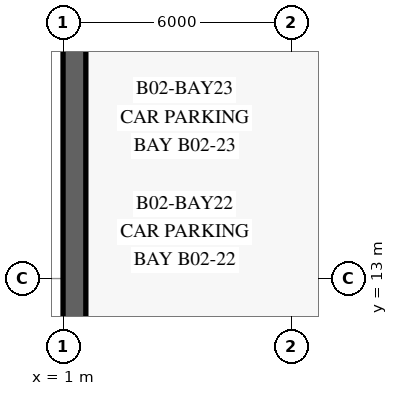
"""IFC4 building model, lengths in metres.
Left out: names, types, materials, properties, quantities, classifications, styles, units other than length and angle.
Written with IfcOpenShell. Run it as: python <this file> out.ifc"""

import sys

from ifc_helpers import new_model, si_unit, direction, frame, frame_2d, origin, place, context, subcontext, project, spatial, rectangle, extrude, element, save


model = new_model("IFC4")
c1 = context("Model", 3, precision=1e-05, world=origin(), true_north=direction((0.0, 1.0)))
c2 = subcontext(c1, "Body", "Model", "MODEL_VIEW")
j1 = project(units=[si_unit("LENGTHUNIT", "METRE"), si_unit("PLANEANGLEUNIT", "RADIAN")], contexts=[c1])
p1 = place(None, origin())
s1 = spatial("IfcSite", under=j1, at=p1, CompositionType="ELEMENT")
p2 = place(p1, origin())
s2 = spatial("IfcBuilding", under=s1, at=p2, CompositionType="ELEMENT")
p3 = place(p2, frame((0.0, 0.0, -8.4)))
s3 = spatial("IfcBuildingStorey", under=s2, at=p3, CompositionType="ELEMENT", Elevation=-8.4)
p4 = place(p3, frame((1.3, 48.4, 0.0), z_axis=(0.0, 0.0, 1.0), x_axis=(0.0, -1.0, 0.0)))
e1 = element("IfcWall", 1, at=p4, inside=s3, PredefinedType="USERDEFINED", context=c2, shape_type="SweptSolid", body=[
    extrude(rectangle(XDim=46.8, YDim=0.6, at=frame_2d((23.4, 0.0))), origin(), (0.0, 0.0, 1.0), 3.88),
])
save(model, sys.argv[1])
